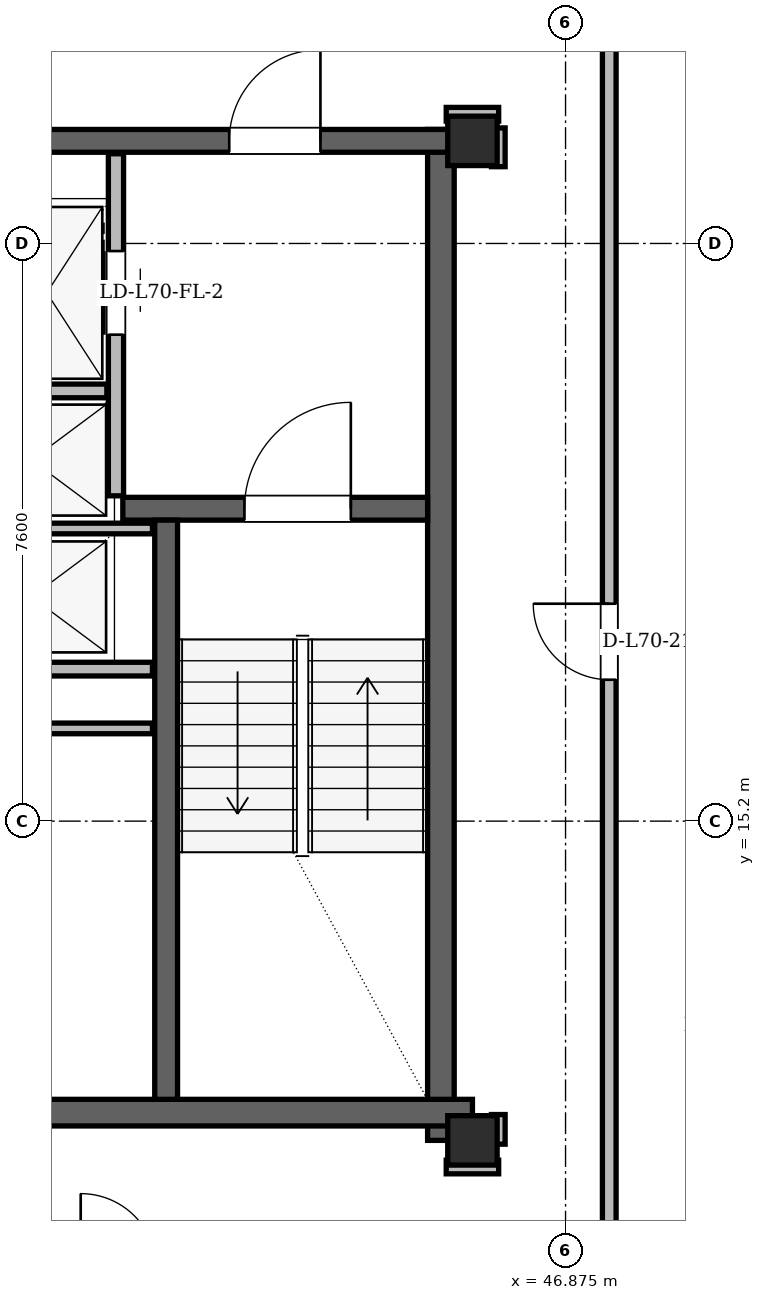
"""IFC4 building model, lengths in metres.
Left out: names, types, materials, properties, quantities, classifications, styles, units other than length and angle.
Written with IfcOpenShell. Run it as: python <this file> out.ifc"""

import sys

from ifc_helpers import new_model, si_unit, direction, frame, frame_2d, origin, origin_2d, place, context, subcontext, project, spatial, rectangle, hollow_rectangle, extrude, element, fill, save


model = new_model("IFC4")
c1 = context("Model", 3, precision=1e-05, world=origin(), true_north=direction((0.0, 1.0)))
c2 = subcontext(c1, "Body", "Model", "MODEL_VIEW")
j1 = project(units=[si_unit("LENGTHUNIT", "METRE"), si_unit("PLANEANGLEUNIT", "RADIAN")], contexts=[c1])
p1 = place(None, origin())
s1 = spatial("IfcSite", under=j1, at=p1, CompositionType="ELEMENT")
p2 = place(p1, origin())
s2 = spatial("IfcBuilding", under=s1, at=p2, CompositionType="ELEMENT")
p3 = place(p2, frame((0.0, 0.0, 265.5)))
s3 = spatial("IfcBuildingStorey", under=s2, at=p3, CompositionType="ELEMENT", Elevation=265.5)
for number, where, z_axis, x_axis in (
    (1, (45.65, 11.0, 0.0), (0.0, 0.0, 1.0), (1.0, 0.0, 0.0)),
    (2, (45.65, 24.15, 0.0), (0.0, 0.0, 1.0), (1.0, 0.0, 0.0)),
):
    element("IfcColumn", number, at=place(p3, frame(where, z_axis=z_axis, x_axis=x_axis)), inside=s3, PredefinedType="COLUMN", context=c2, shape_type="SweptSolid", body=[
        extrude(hollow_rectangle(XDim=0.65, YDim=0.65, WallThickness=0.05, at=origin_2d()), origin(), (0.0, 0.0, 1.0), 3.9),
    ])
p4 = place(p3, frame((45.235, 11.0, 0.0), z_axis=(0.0, 0.0, 1.0), x_axis=(0.0, 1.0, 0.0)))
e3 = element("IfcWall", 3, at=p4, inside=s3, PredefinedType="SHEAR", context=c2, shape_type="SweptSolid", body=[
    extrude(rectangle(XDim=13.3, YDim=0.35, at=frame_2d((6.65, 0.0))), origin(), (0.0, 0.0, 1.0), 3.68),
])
p5 = place(p3, frame((38.55, 11.365, 0.0), z_axis=(0.0, 0.0, 1.0), x_axis=(1.0, 0.0, 0.0)))
e4 = element("IfcWall", 4, at=p5, inside=s3, PredefinedType="SHEAR", context=c2, shape_type="SweptSolid", body=[
    extrude(rectangle(XDim=7.1, YDim=0.35, at=frame_2d((3.55, 0.0))), origin(), (0.0, 0.0, 1.0), 3.68),
])
p6 = place(p3, frame((29.65, 24.15, 0.0), z_axis=(0.0, 0.0, 1.0), x_axis=(1.0, 0.0, 0.0)))
e5 = element("IfcWall", 5, at=p6, inside=s3, PredefinedType="SHEAR", context=c2, shape_type="SweptSolid", body=[
    extrude(rectangle(XDim=15.7, YDim=0.3, at=frame_2d((7.85, 0.0))), origin(), (0.0, 0.0, 1.0), 3.68),
])
p7 = place(p6, frame((1.7, 0.0, 0.0)))
e6 = element("IfcOpeningElement", 6, at=p7, cuts=e5, PredefinedType="OPENING", context=c2, shape_type="SweptSolid", body=[
    extrude(rectangle(XDim=1.2, YDim=2.2, at=frame_2d((0.6, 1.1))), frame((0.0, 0.15, 0.0), z_axis=(0.0, -1.0, 0.0), x_axis=(1.0, 0.0, 0.0)), (0.0, 0.0, 1.0), 0.3),
])
p8 = place(p6, frame((12.8, 0.0, 0.0)))
e7 = element("IfcOpeningElement", 7, at=p8, cuts=e5, PredefinedType="OPENING", context=c2, shape_type="SweptSolid", body=[
    extrude(rectangle(XDim=1.2, YDim=2.2, at=frame_2d((0.6, 1.1))), frame((0.0, 0.15, 0.0), z_axis=(0.0, -1.0, 0.0), x_axis=(1.0, 0.0, 0.0)), (0.0, 0.0, 1.0), 0.3),
])
p9 = place(p6, frame((6.55, 0.0, 0.0)))
e8 = element("IfcOpeningElement", 8, at=p9, cuts=e5, PredefinedType="OPENING", context=c2, shape_type="SweptSolid", body=[
    extrude(rectangle(XDim=0.9, YDim=2.05, at=frame_2d((0.45, 1.025))), frame((0.0, 0.15, 0.0), z_axis=(0.0, -1.0, 0.0), x_axis=(1.0, 0.0, 0.0)), (0.0, 0.0, 1.0), 0.3),
])
p10 = place(p6, frame((8.45, 0.0, 0.0)))
e9 = element("IfcOpeningElement", 9, at=p10, cuts=e5, PredefinedType="OPENING", context=c2, shape_type="SweptSolid", body=[
    extrude(rectangle(XDim=0.9, YDim=2.05, at=frame_2d((0.45, 1.025))), frame((0.0, 0.15, 0.0), z_axis=(0.0, -1.0, 0.0), x_axis=(1.0, 0.0, 0.0)), (0.0, 0.0, 1.0), 0.3),
])
p11 = place(p3, frame((41.05, 19.31, 0.0), z_axis=(0.0, 0.0, 1.0), x_axis=(1.0, 0.0, 0.0)))
e10 = element("IfcWall", 10, at=p11, inside=s3, PredefinedType="SHEAR", context=c2, shape_type="SweptSolid", body=[
    extrude(rectangle(XDim=4.01, YDim=0.3, at=frame_2d((2.005, 0.0))), origin(), (0.0, 0.0, 1.0), 3.68),
])
p12 = place(p11, frame((1.6, 0.0, 0.0)))
e11 = element("IfcOpeningElement", 11, at=p12, cuts=e10, PredefinedType="OPENING", context=c2, shape_type="SweptSolid", body=[
    extrude(rectangle(XDim=1.4, YDim=2.2, at=frame_2d((0.7, 1.1))), frame((0.0, 0.15, 0.0), z_axis=(0.0, -1.0, 0.0), x_axis=(1.0, 0.0, 0.0)), (0.0, 0.0, 1.0), 0.3),
])
p13 = place(p3, frame((41.62, 11.54, 0.0), z_axis=(0.0, 0.0, 1.0), x_axis=(0.0, 1.0, 0.0)))
e12 = element("IfcWall", 12, at=p13, inside=s3, PredefinedType="SHEAR", context=c2, shape_type="SweptSolid", body=[
    extrude(rectangle(XDim=7.62, YDim=0.3, at=frame_2d((3.81, 0.0))), origin(), (0.0, 0.0, 1.0), 3.68),
])
p14 = place(p3, frame((40.96, 19.48, 0.0), z_axis=(0.0, 0.0, 1.0), x_axis=(0.0, 1.0, 0.0)))
e13 = element("IfcWall", 13, at=p14, inside=s3, PredefinedType="PARTITIONING", context=c2, shape_type="SweptSolid", body=[
    extrude(rectangle(XDim=4.5, YDim=0.2, at=frame_2d((2.25, 0.0))), origin(), (0.0, 0.0, 1.0), 3.68),
])
p15 = place(p14, frame((2.12, 0.0, 0.0)))
e14 = element("IfcOpeningElement", 14, at=p15, cuts=e13, PredefinedType="OPENING", context=c2, shape_type="SweptSolid", body=[
    extrude(rectangle(XDim=1.1, YDim=2.2, at=frame_2d((0.55, 1.1))), frame((0.0, 0.1, 0.0), z_axis=(0.0, -1.0, 0.0), x_axis=(1.0, 0.0, 0.0)), (0.0, 0.0, 1.0), 0.2),
])
p16 = place(p3, frame((39.26, 20.86, 0.0), z_axis=(0.0, 0.0, 1.0), x_axis=(1.0, 0.0, 0.0)))
e15 = element("IfcWall", 15, at=p16, inside=s3, PredefinedType="PARTITIONING", context=c2, shape_type="SweptSolid", body=[
    extrude(rectangle(XDim=1.58, YDim=0.18, at=frame_2d((0.79, 0.0))), origin(), (0.0, 0.0, 1.0), 3.68),
])
p17 = place(p3, frame((38.78, 17.2, 0.0), z_axis=(0.0, 0.0, 1.0), x_axis=(1.0, 0.0, 0.0)))
e16 = element("IfcWall", 16, at=p17, inside=s3, PredefinedType="PARTITIONING", context=c2, shape_type="SweptSolid", body=[
    extrude(rectangle(XDim=2.66, YDim=0.18, at=frame_2d((1.33, 0.0))), origin(), (0.0, 0.0, 1.0), 3.68),
])
for number, where, z_axis, x_axis in (
    (17, (38.78, 19.05, 0.0), (0.0, 0.0, 1.0), (1.0, 0.0, 0.0)),
    (18, (38.78, 16.42, 0.0), (0.0, 0.0, 1.0), (1.0, 0.0, 0.0)),
):
    element("IfcWall", number, at=place(p3, frame(where, z_axis=z_axis, x_axis=x_axis)), inside=s3, PredefinedType="PARTITIONING", context=c2, shape_type="SweptSolid", body=[
        extrude(rectangle(XDim=2.66, YDim=0.14, at=frame_2d((1.33, 0.0))), origin(), (0.0, 0.0, 1.0), 3.68),
    ])
p18 = place(p3, frame((45.305, 10.65, 0.0), z_axis=(0.0, 0.0, 1.0), x_axis=(1.0, 0.0, 0.0)))
e19 = element("IfcWall", 19, at=p18, inside=s3, PredefinedType="PARTITIONING", context=c2, shape_type="SweptSolid", body=[
    extrude(rectangle(XDim=0.69, YDim=0.18, at=frame_2d((0.345, 0.0))), origin(), (0.0, 0.0, 1.0), 3.68),
])
p19 = place(p3, frame((45.305, 24.5, 0.0), z_axis=(0.0, 0.0, 1.0), x_axis=(1.0, 0.0, 0.0)))
e20 = element("IfcWall", 20, at=p19, inside=s3, PredefinedType="PARTITIONING", context=c2, shape_type="SweptSolid", body=[
    extrude(rectangle(XDim=0.69, YDim=0.18, at=frame_2d((0.345, 0.0))), origin(), (0.0, 0.0, 1.0), 3.266),
])
p20 = place(p3, frame((45.99, 10.95, 0.0), z_axis=(0.0, 0.0, 1.0), x_axis=(0.0, 1.0, 0.0)))
e21 = element("IfcWall", 21, at=p20, inside=s3, PredefinedType="PARTITIONING", context=c2, shape_type="SweptSolid", body=[
    extrude(rectangle(XDim=0.39, YDim=0.18, at=frame_2d((0.195, 0.0))), origin(), (0.0, 0.0, 1.0), 3.68),
])
p21 = place(p3, frame((45.99, 23.81, 0.0), z_axis=(0.0, 0.0, 1.0), x_axis=(0.0, 1.0, 0.0)))
e22 = element("IfcWall", 22, at=p21, inside=s3, PredefinedType="PARTITIONING", context=c2, shape_type="SweptSolid", body=[
    extrude(rectangle(XDim=0.51, YDim=0.18, at=frame_2d((0.255, 0.0))), origin(), (0.0, 0.0, 1.0), 3.68),
])
p22 = place(p3, frame((47.45, 6.624, 0.0), z_axis=(0.0, 0.0, 1.0), x_axis=(0.0, 1.0, 0.0)))
e23 = element("IfcWall", 23, at=p22, inside=s3, PredefinedType="PARTITIONING", context=c2, shape_type="SweptSolid", body=[
    extrude(rectangle(XDim=23.195, YDim=0.18, at=frame_2d((11.597, 0.0))), origin(), (0.0, 0.0, 1.0), 3.058),
])
p23 = place(p22, frame((10.437, 0.0, 0.0)))
e24 = element("IfcOpeningElement", 24, at=p23, cuts=e23, PredefinedType="OPENING", context=c2, shape_type="SweptSolid", body=[
    extrude(rectangle(XDim=1.0, YDim=2.18, at=frame_2d((0.5, 1.09))), frame((0.0, 0.09, 0.0), z_axis=(0.0, -1.0, 0.0), x_axis=(1.0, 0.0, 0.0)), (0.0, 0.0, 1.0), 0.18),
])
p24 = place(p15, origin())
e25 = element("IfcDoor", 25, at=p24, inside=s3, OperationType="SLIDING_TO_RIGHT", PredefinedType="DOOR", context=c2, shape_type="SweptSolid", body=[
    extrude(rectangle(XDim=1.1, YDim=2.2, at=frame_2d((0.55, 1.1))), frame((0.0, 0.025, 0.0), z_axis=(0.0, -1.0, 0.0), x_axis=(1.0, 0.0, 0.0)), (0.0, 0.0, 1.0), 0.05),
])
fill(e14, e25)
p25 = place(p12, origin())
e26 = element("IfcDoor", 26, at=p25, inside=s3, OperationType="SINGLE_SWING_RIGHT", PredefinedType="DOOR", context=c2, shape_type="SweptSolid", body=[
    extrude(rectangle(XDim=1.4, YDim=2.2, at=frame_2d((0.7, 1.1))), frame((0.0, 0.025, 0.0), z_axis=(0.0, -1.0, 0.0), x_axis=(1.0, 0.0, 0.0)), (0.0, 0.0, 1.0), 0.05),
])
fill(e11, e26)
p26 = place(p8, origin())
e27 = element("IfcDoor", 27, at=p26, inside=s3, OperationType="SINGLE_SWING_RIGHT", PredefinedType="DOOR", context=c2, shape_type="SweptSolid", body=[
    extrude(rectangle(XDim=1.2, YDim=2.2, at=frame_2d((0.6, 1.1))), frame((0.0, 0.025, 0.0), z_axis=(0.0, -1.0, 0.0), x_axis=(1.0, 0.0, 0.0)), (0.0, 0.0, 1.0), 0.05),
])
fill(e7, e27)
p27 = place(p23, origin())
e28 = element("IfcDoor", 28, at=p27, inside=s3, OperationType="SINGLE_SWING_RIGHT", PredefinedType="DOOR", context=c2, shape_type="SweptSolid", body=[
    extrude(rectangle(XDim=1.0, YDim=2.18, at=frame_2d((0.5, 1.09))), frame((0.0, 0.025, 0.0), z_axis=(0.0, -1.0, 0.0), x_axis=(1.0, 0.0, 0.0)), (0.0, 0.0, 1.0), 0.05),
])
fill(e24, e28)
save(model, sys.argv[1])
